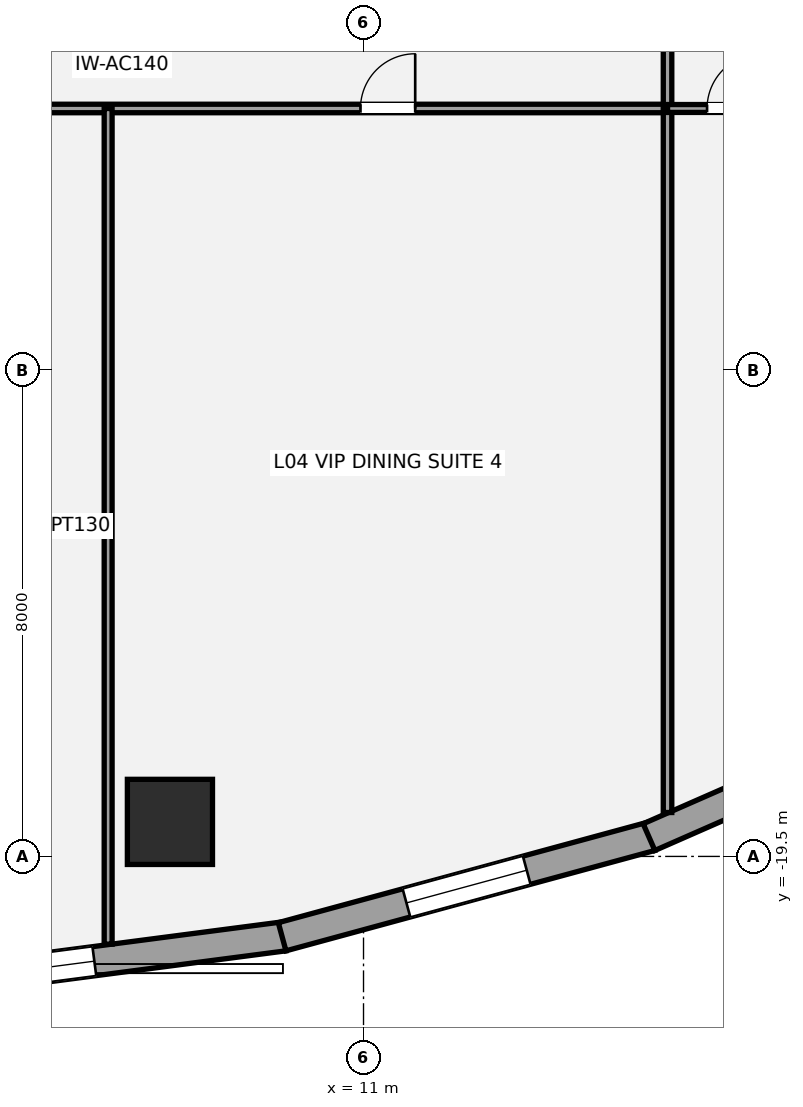
"""IFC4 building model, lengths in metres.
Left out: names, types, materials, properties, quantities, classifications, styles, units other than length and angle.
Written with IfcOpenShell. Run it as: python <this file> out.ifc"""

import sys

from ifc_helpers import new_model, si_unit, direction, frame, frame_2d, origin, origin_2d, place, context, subcontext, project, spatial, rectangle, hollow_circle, extrude, element, fill, save


model = new_model("IFC4")
c1 = context("Model", 3, precision=1e-05, world=origin(), true_north=direction((0.0, 1.0)))
c2 = subcontext(c1, "Body", "Model", "MODEL_VIEW")
j1 = project(units=[si_unit("LENGTHUNIT", "METRE"), si_unit("PLANEANGLEUNIT", "RADIAN")], contexts=[c1])
p1 = place(None, origin())
s1 = spatial("IfcSite", under=j1, at=p1, CompositionType="ELEMENT")
p2 = place(p1, origin())
s2 = spatial("IfcBuilding", under=s1, at=p2, CompositionType="ELEMENT")
p3 = place(p2, frame((0.0, 0.0, 18.6)))
s3 = spatial("IfcBuildingStorey", under=s2, at=p3, CompositionType="ELEMENT", Elevation=18.6)
p4 = place(p3, frame((7.816, -18.932, 0.0), z_axis=(0.0, 0.0, 1.0), x_axis=(1.0, 0.0, 0.0)))
e1 = element("IfcColumn", 1, at=p4, inside=s3, PredefinedType="USERDEFINED", context=c2, shape_type="SweptSolid", body=[
    extrude(hollow_circle(Radius=0.7, WallThickness=0.05, at=origin_2d()), origin(), (0.0, 0.0, 1.0), 4.2),
])
p5 = place(p3, frame((9.693, -20.815, 0.0), z_axis=(0.0, 0.0, 1.0), x_axis=(-0.991576921472, -0.129519144545, 0.0)))
e2 = element("IfcWall", 2, at=p5, inside=s3, PredefinedType="STANDARD", context=c2, shape_type="SweptSolid", body=[
    extrude(rectangle(XDim=6.496, YDim=0.48, at=frame_2d((3.248, 0.0))), origin(), (0.0, 0.0, 1.0), 3.109),
])
p6 = place(p5, frame((3.147, 0.0, 0.72)))
e3 = element("IfcOpeningElement", 3, at=p6, cuts=e2, PredefinedType="OPENING", context=c2, shape_type="SweptSolid", body=[
    extrude(rectangle(XDim=2.05, YDim=1.8, at=frame_2d((1.025, 0.9))), frame((0.0, 0.25, 0.0), z_axis=(0.0, -1.0, 0.0), x_axis=(1.0, 0.0, 0.0)), (0.0, 0.0, 1.0), 0.5),
])
p7 = place(p3, frame((15.729, -19.171, 0.0), z_axis=(0.0, 0.0, 1.0), x_axis=(-0.964936550718, -0.262483243445, 0.0)))
e4 = element("IfcWall", 4, at=p7, inside=s3, PredefinedType="STANDARD", context=c2, shape_type="SweptSolid", body=[
    extrude(rectangle(XDim=6.288, YDim=0.48, at=frame_2d((3.144, 0.0))), origin(), (0.0, 0.0, 1.0), 3.109),
])
p8 = place(p7, frame((2.119, 0.0, 0.72)))
e5 = element("IfcOpeningElement", 5, at=p8, cuts=e4, PredefinedType="OPENING", context=c2, shape_type="SweptSolid", body=[
    extrude(rectangle(XDim=2.05, YDim=1.8, at=frame_2d((1.025, 0.9))), frame((0.0, 0.25, 0.0), z_axis=(0.0, -1.0, 0.0), x_axis=(1.0, 0.0, 0.0)), (0.0, 0.0, 1.0), 0.5),
])
p9 = place(p3, frame((21.156, -16.786, 0.0), z_axis=(0.0, 0.0, 1.0), x_axis=(-0.91570760638, -0.401845218484, 0.0)))
e6 = element("IfcWall", 6, at=p9, inside=s3, PredefinedType="STANDARD", context=c2, shape_type="SweptSolid", body=[
    extrude(rectangle(XDim=5.963, YDim=0.48, at=frame_2d((2.981, 0.0))), origin(), (0.0, 0.0, 1.0), 3.109),
])
p10 = place(p9, frame((1.957, 0.0, 0.72)))
e7 = element("IfcOpeningElement", 7, at=p10, cuts=e6, PredefinedType="OPENING", context=c2, shape_type="SweptSolid", body=[
    extrude(rectangle(XDim=2.05, YDim=1.8, at=frame_2d((1.025, 0.9))), frame((0.0, 0.25, 0.0), z_axis=(0.0, -1.0, 0.0), x_axis=(1.0, 0.0, 0.0)), (0.0, 0.0, 1.0), 0.5),
])
p11 = place(p3, frame((-18.6, -7.2, 0.0), z_axis=(0.0, 0.0, 1.0), x_axis=(1.0, 0.0, 0.0)))
e8 = element("IfcWall", 8, at=p11, inside=s3, PredefinedType="PARTITIONING", context=c2, shape_type="SweptSolid", body=[
    extrude(rectangle(XDim=34.6, YDim=0.14, at=frame_2d((17.3, 0.0))), origin(), (0.0, 0.0, 1.0), 3.98),
])
p12 = place(p11, frame((3.6, 0.0, 0.0)))
e9 = element("IfcOpeningElement", 9, at=p12, cuts=e8, PredefinedType="OPENING", context=c2, shape_type="SweptSolid", body=[
    extrude(rectangle(XDim=0.9, YDim=2.1, at=frame_2d((0.45, 1.05))), frame((0.0, 0.08, 0.0), z_axis=(0.0, -1.0, 0.0), x_axis=(1.0, 0.0, 0.0)), (0.0, 0.0, 1.0), 0.16),
])
p13 = place(p11, frame((12.15, 0.0, 0.0)))
e10 = element("IfcOpeningElement", 10, at=p13, cuts=e8, PredefinedType="OPENING", context=c2, shape_type="SweptSolid", body=[
    extrude(rectangle(XDim=0.9, YDim=2.1, at=frame_2d((0.45, 1.05))), frame((0.0, 0.08, 0.0), z_axis=(0.0, -1.0, 0.0), x_axis=(1.0, 0.0, 0.0)), (0.0, 0.0, 1.0), 0.16),
])
p14 = place(p11, frame((20.8, 0.0, 0.0)))
e11 = element("IfcOpeningElement", 11, at=p14, cuts=e8, PredefinedType="OPENING", context=c2, shape_type="SweptSolid", body=[
    extrude(rectangle(XDim=0.9, YDim=2.1, at=frame_2d((0.45, 1.05))), frame((0.0, 0.08, 0.0), z_axis=(0.0, -1.0, 0.0), x_axis=(1.0, 0.0, 0.0)), (0.0, 0.0, 1.0), 0.16),
])
p15 = place(p11, frame((29.55, 0.0, 0.0)))
e12 = element("IfcOpeningElement", 12, at=p15, cuts=e8, PredefinedType="OPENING", context=c2, shape_type="SweptSolid", body=[
    extrude(rectangle(XDim=0.9, YDim=2.1, at=frame_2d((0.45, 1.05))), frame((0.0, 0.08, 0.0), z_axis=(0.0, -1.0, 0.0), x_axis=(1.0, 0.0, 0.0)), (0.0, 0.0, 1.0), 0.16),
])
p16 = place(p3, frame((16.0, -18.778, 0.0), z_axis=(0.0, 0.0, 1.0), x_axis=(0.0, 1.0, 0.0)))
e13 = element("IfcWall", 13, at=p16, inside=s3, PredefinedType="PARTITIONING", context=c2, shape_type="SweptSolid", body=[
    extrude(rectangle(XDim=26.328, YDim=0.14, at=frame_2d((13.164, 0.0))), origin(), (0.0, 0.0, 1.0), 3.348),
])
p17 = place(p16, frame((13.628, 0.0, 0.0)))
e14 = element("IfcOpeningElement", 14, at=p17, cuts=e13, PredefinedType="OPENING", context=c2, shape_type="SweptSolid", body=[
    extrude(rectangle(XDim=0.9, YDim=2.1, at=frame_2d((0.45, 1.05))), frame((0.0, 0.08, 0.0), z_axis=(0.0, -1.0, 0.0), x_axis=(1.0, 0.0, 0.0)), (0.0, 0.0, 1.0), 0.16),
])
p18 = place(p16, frame((18.528, 0.0, 0.0)))
e15 = element("IfcOpeningElement", 15, at=p18, cuts=e13, PredefinedType="OPENING", context=c2, shape_type="SweptSolid", body=[
    extrude(rectangle(XDim=0.9, YDim=2.1, at=frame_2d((0.45, 1.05))), frame((0.0, 0.08, 0.0), z_axis=(0.0, -1.0, 0.0), x_axis=(1.0, 0.0, 0.0)), (0.0, 0.0, 1.0), 0.16),
])
p19 = place(p16, frame((23.403, 0.0, 0.0)))
e16 = element("IfcOpeningElement", 16, at=p19, cuts=e13, PredefinedType="OPENING", context=c2, shape_type="SweptSolid", body=[
    extrude(rectangle(XDim=0.9, YDim=2.1, at=frame_2d((0.45, 1.05))), frame((0.0, 0.08, 0.0), z_axis=(0.0, -1.0, 0.0), x_axis=(1.0, 0.0, 0.0)), (0.0, 0.0, 1.0), 0.16),
])
p20 = place(p3, frame((6.8, -20.943, 0.0), z_axis=(0.0, 0.0, 1.0), x_axis=(0.0, 1.0, 0.0)))
e17 = element("IfcWall", 17, at=p20, inside=s3, PredefinedType="PARTITIONING", context=c2, shape_type="SweptSolid", body=[
    extrude(rectangle(XDim=13.743, YDim=0.13, at=frame_2d((6.871, 0.0))), origin(), (0.0, 0.0, 1.0), 3.348),
])
p21 = place(p3, frame((16.0, -7.2, 0.0), z_axis=(0.0, 0.0, 1.0), x_axis=(1.0, 0.0, 0.0)))
e18 = element("IfcWall", 18, at=p21, inside=s3, PredefinedType="PARTITIONING", context=c2, shape_type="SweptSolid", body=[
    extrude(rectangle(XDim=14.967, YDim=0.13, at=frame_2d((7.484, 0.0))), origin(), (0.0, 0.0, 1.0), 2.958),
])
p22 = place(p21, frame((0.65, 0.0, 0.0)))
e19 = element("IfcOpeningElement", 19, at=p22, cuts=e18, PredefinedType="OPENING", context=c2, shape_type="SweptSolid", body=[
    extrude(rectangle(XDim=0.9, YDim=2.1, at=frame_2d((0.45, 1.05))), frame((0.0, 0.075, 0.0), z_axis=(0.0, -1.0, 0.0), x_axis=(1.0, 0.0, 0.0)), (0.0, 0.0, 1.0), 0.15),
])
p23 = place(p6, origin())
e20 = element("IfcWindow", 20, at=p23, inside=s3, PartitioningType="SINGLE_PANEL", PredefinedType="WINDOW", context=c2, shape_type="SweptSolid", body=[
    extrude(rectangle(XDim=2.05, YDim=1.8, at=frame_2d((1.025, 0.9))), frame((0.0, -0.01, 0.0), z_axis=(0.0, -1.0, 0.0), x_axis=(1.0, 0.0, 0.0)), (0.0, 0.0, 1.0), 0.06),
])
fill(e3, e20)
p24 = place(p8, origin())
e21 = element("IfcWindow", 21, at=p24, inside=s3, PartitioningType="SINGLE_PANEL", PredefinedType="WINDOW", context=c2, shape_type="SweptSolid", body=[
    extrude(rectangle(XDim=2.05, YDim=1.8, at=frame_2d((1.025, 0.9))), frame((0.0, -0.01, 0.0), z_axis=(0.0, -1.0, 0.0), x_axis=(1.0, 0.0, 0.0)), (0.0, 0.0, 1.0), 0.06),
])
fill(e5, e21)
p25 = place(p15, origin())
e22 = element("IfcDoor", 22, at=p25, inside=s3, OperationType="SINGLE_SWING_RIGHT", PredefinedType="DOOR", context=c2, shape_type="SweptSolid", body=[
    extrude(rectangle(XDim=0.9, YDim=2.1, at=frame_2d((0.45, 1.05))), frame((0.0, 0.025, 0.0), z_axis=(0.0, -1.0, 0.0), x_axis=(1.0, 0.0, 0.0)), (0.0, 0.0, 1.0), 0.05),
])
fill(e12, e22)
p26 = place(p22, origin())
e23 = element("IfcDoor", 23, at=p26, inside=s3, OperationType="SINGLE_SWING_RIGHT", PredefinedType="DOOR", context=c2, shape_type="SweptSolid", body=[
    extrude(rectangle(XDim=0.9, YDim=2.1, at=frame_2d((0.45, 1.05))), frame((0.0, 0.025, 0.0), z_axis=(0.0, -1.0, 0.0), x_axis=(1.0, 0.0, 0.0)), (0.0, 0.0, 1.0), 0.05),
])
fill(e19, e23)
save(model, sys.argv[1])
